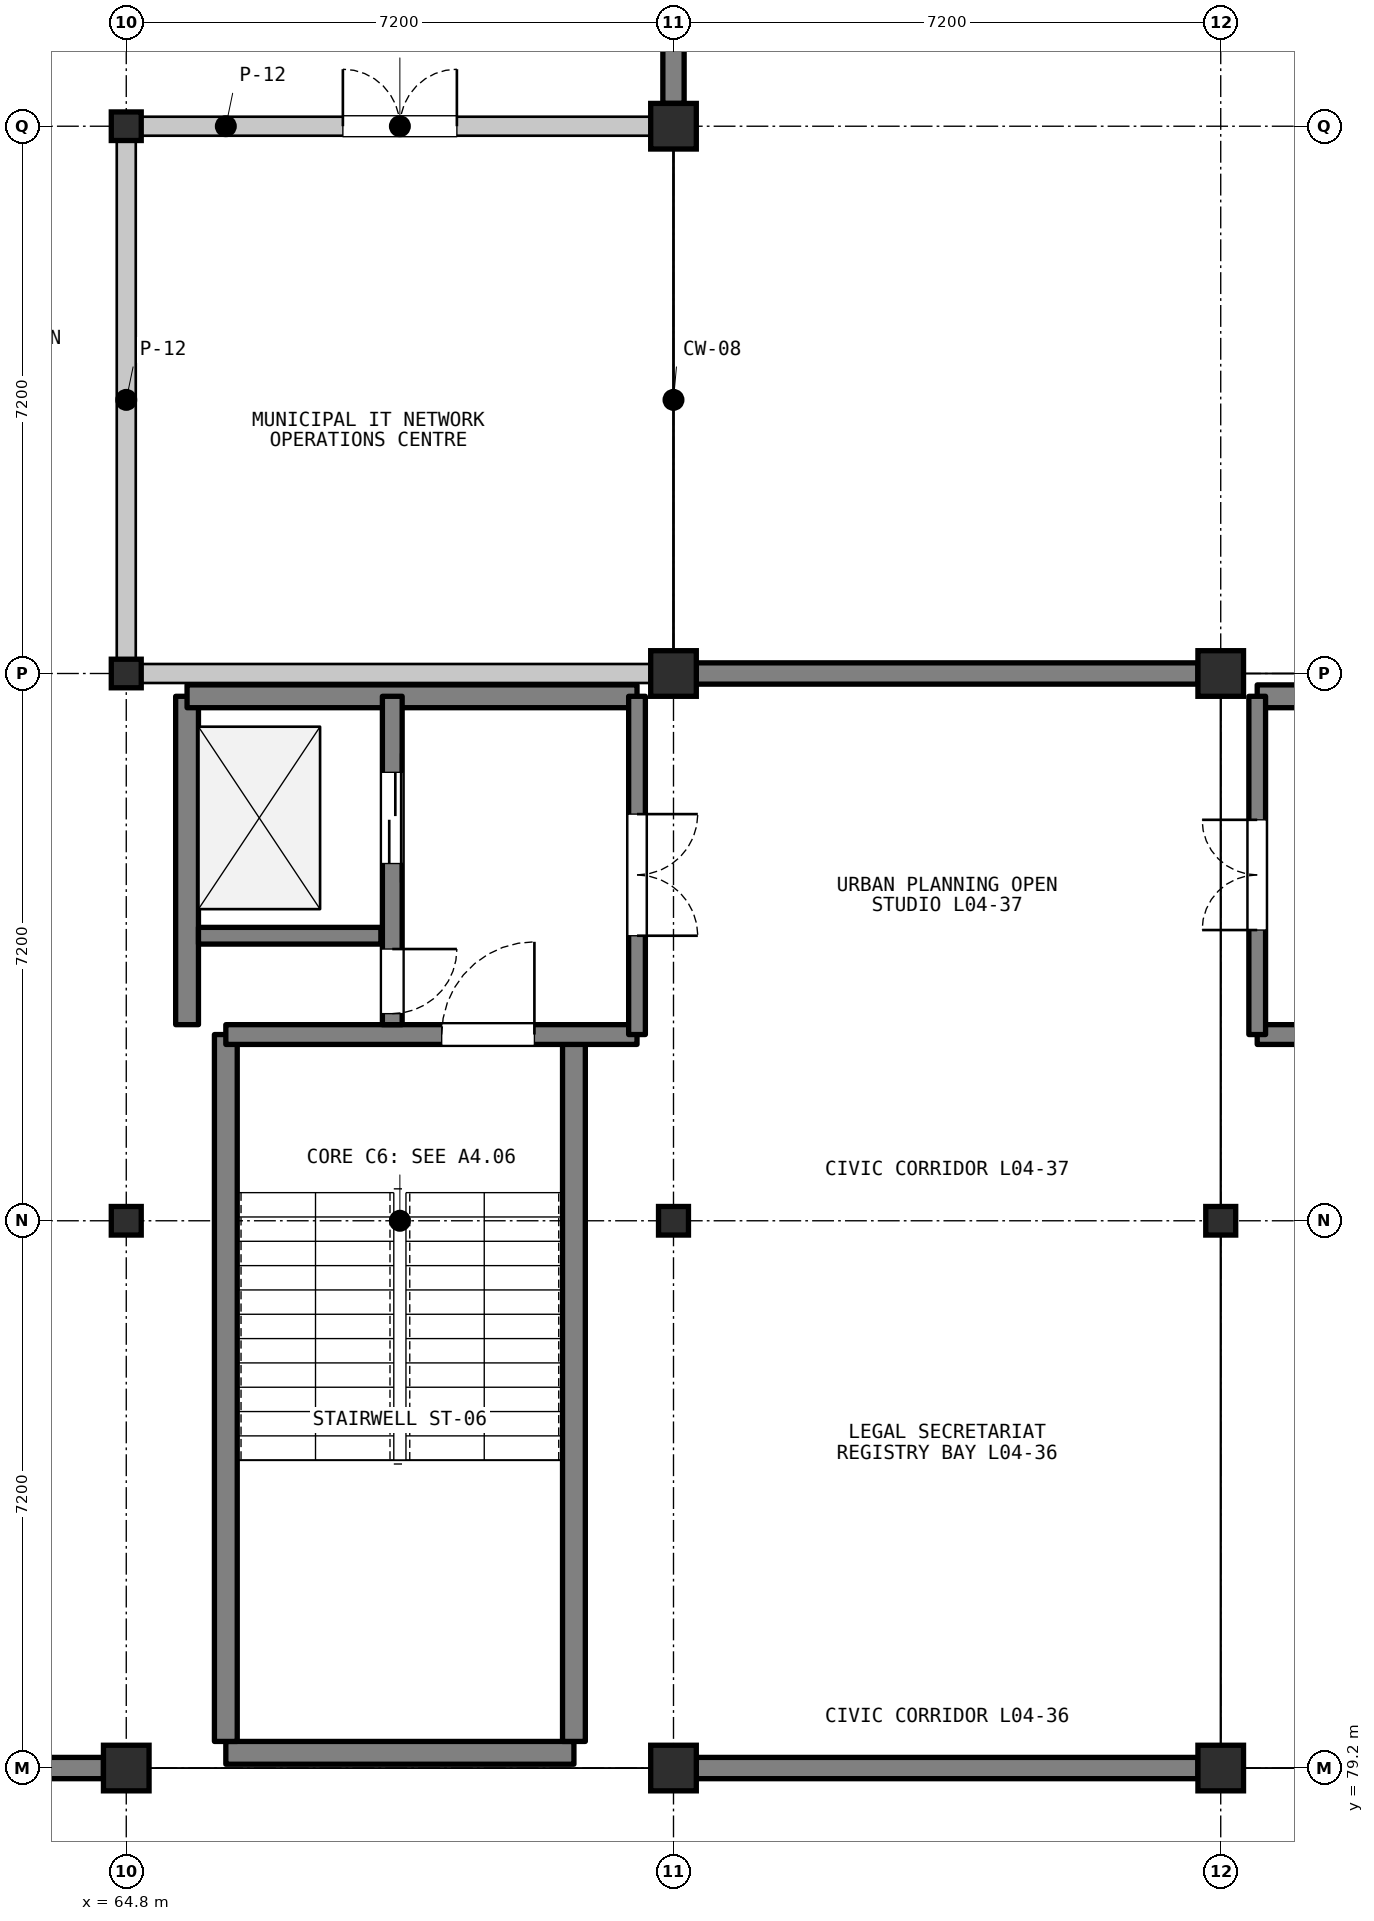
"""IFC4 building model, lengths in metres.
Left out: names, types, materials, properties, quantities, classifications, styles, units other than length and angle.
Written with IfcOpenShell. Run it as: python <this file> out.ifc"""

import sys

from ifc_helpers import new_model, si_unit, direction, frame, frame_2d, origin, origin_2d, place, context, subcontext, project, spatial, rectangle, i_section, extrude, element, fill, save


model = new_model("IFC4")
c1 = context("Model", 3, precision=1e-05, world=origin(), true_north=direction((0.0, 1.0)))
c2 = subcontext(c1, "Body", "Model", "MODEL_VIEW")
j1 = project(units=[si_unit("LENGTHUNIT", "METRE"), si_unit("PLANEANGLEUNIT", "RADIAN")], contexts=[c1])
p1 = place(None, origin())
s1 = spatial("IfcSite", under=j1, at=p1, CompositionType="ELEMENT")
p2 = place(p1, origin())
s2 = spatial("IfcBuilding", under=s1, at=p2, CompositionType="ELEMENT")
p3 = place(p2, frame((0.0, 0.0, 14.1)))
s3 = spatial("IfcBuildingStorey", under=s2, at=p3, CompositionType="ELEMENT", Elevation=14.1)
p4 = place(p3, frame((64.8, 79.2, 0.0), z_axis=(0.0, 0.0, 1.0), x_axis=(1.0, 0.0, 0.0)))
e1 = element("IfcColumn", 1, at=p4, inside=s3, PredefinedType="COLUMN", context=c2, shape_type="SweptSolid", body=[
    extrude(rectangle(XDim=0.6, YDim=0.6, at=origin_2d()), origin(), (0.0, 0.0, 1.0), 3.9),
])
for number, where, z_axis, x_axis in (
    (2, (64.8, 86.4, 0.0), (0.0, 0.0, 1.0), (1.0, 0.0, 0.0)),
    (3, (64.8, 93.6, 0.0), (0.0, 0.0, 1.0), (1.0, 0.0, 0.0)),
    (4, (64.8, 100.8, 0.0), (0.0, 0.0, 1.0), (1.0, 0.0, 0.0)),
):
    element("IfcColumn", number, at=place(p3, frame(where, z_axis=z_axis, x_axis=x_axis)), inside=s3, PredefinedType="COLUMN", context=c2, shape_type="SweptSolid", body=[
        extrude(i_section(OverallWidth=0.394, OverallDepth=0.376, WebThickness=0.017, FlangeThickness=0.028, FilletRadius=0.015, at=origin_2d()), origin(), (0.0, 0.0, 1.0), 3.9),
    ])
p5 = place(p3, frame((72.0, 79.2, 0.0), z_axis=(0.0, 0.0, 1.0), x_axis=(1.0, 0.0, 0.0)))
e5 = element("IfcColumn", 5, at=p5, inside=s3, PredefinedType="COLUMN", context=c2, shape_type="SweptSolid", body=[
    extrude(rectangle(XDim=0.6, YDim=0.6, at=origin_2d()), origin(), (0.0, 0.0, 1.0), 3.9),
])
p6 = place(p3, frame((72.0, 86.4, 0.0), z_axis=(0.0, 0.0, 1.0), x_axis=(1.0, 0.0, 0.0)))
e6 = element("IfcColumn", 6, at=p6, inside=s3, PredefinedType="COLUMN", context=c2, shape_type="SweptSolid", body=[
    extrude(i_section(OverallWidth=0.394, OverallDepth=0.376, WebThickness=0.017, FlangeThickness=0.028, FilletRadius=0.015, at=origin_2d()), origin(), (0.0, 0.0, 1.0), 3.9),
])
for number, where, z_axis, x_axis in (
    (7, (72.0, 93.6, 0.0), (0.0, 0.0, 1.0), (1.0, 0.0, 0.0)),
    (8, (72.0, 100.8, 0.0), (0.0, 0.0, 1.0), (1.0, 0.0, 0.0)),
    (9, (79.2, 79.2, 0.0), (0.0, 0.0, 1.0), (1.0, 0.0, 0.0)),
):
    element("IfcColumn", number, at=place(p3, frame(where, z_axis=z_axis, x_axis=x_axis)), inside=s3, PredefinedType="COLUMN", context=c2, shape_type="SweptSolid", body=[
        extrude(rectangle(XDim=0.6, YDim=0.6, at=origin_2d()), origin(), (0.0, 0.0, 1.0), 3.9),
    ])
p7 = place(p3, frame((79.2, 86.4, 0.0), z_axis=(0.0, 0.0, 1.0), x_axis=(1.0, 0.0, 0.0)))
e10 = element("IfcColumn", 10, at=p7, inside=s3, PredefinedType="COLUMN", context=c2, shape_type="SweptSolid", body=[
    extrude(i_section(OverallWidth=0.394, OverallDepth=0.376, WebThickness=0.017, FlangeThickness=0.028, FilletRadius=0.015, at=origin_2d()), origin(), (0.0, 0.0, 1.0), 3.9),
])
p8 = place(p3, frame((79.2, 93.6, 0.0), z_axis=(0.0, 0.0, 1.0), x_axis=(1.0, 0.0, 0.0)))
e11 = element("IfcColumn", 11, at=p8, inside=s3, PredefinedType="COLUMN", context=c2, shape_type="SweptSolid", body=[
    extrude(rectangle(XDim=0.6, YDim=0.6, at=origin_2d()), origin(), (0.0, 0.0, 1.0), 3.9),
])
p9 = place(p3, frame((64.5, 79.2, 0.0), z_axis=(0.0, 0.0, 1.0), x_axis=(-1.0, 0.0, 0.0)))
e12 = element("IfcWall", 12, at=p9, inside=s3, PredefinedType="SOLIDWALL", context=c2, shape_type="SweptSolid", body=[
    extrude(rectangle(XDim=6.6, YDim=0.28, at=frame_2d((3.3, 0.0))), origin(), (0.0, 0.0, 1.0), 3.118),
])
p10 = place(p3, frame((72.0, 107.7, 0.0), z_axis=(0.0, 0.0, 1.0), x_axis=(0.0, -1.0, 0.0)))
e13 = element("IfcWall", 13, at=p10, inside=s3, PredefinedType="SOLIDWALL", context=c2, shape_type="SweptSolid", body=[
    extrude(rectangle(XDim=6.6, YDim=0.28, at=frame_2d((3.3, 0.0))), origin(), (0.0, 0.0, 1.0), 3.192),
])
for number, where, z_axis, x_axis in (
    (14, (78.9, 79.2, 0.0), (0.0, 0.0, 1.0), (-1.0, 0.0, 0.0)),
    (15, (72.3, 93.6, 0.0), (0.0, 0.0, 1.0), (1.0, 0.0, 0.0)),
):
    element("IfcWall", number, at=place(p3, frame(where, z_axis=z_axis, x_axis=x_axis)), inside=s3, PredefinedType="SOLIDWALL", context=c2, shape_type="SweptSolid", body=[
        extrude(rectangle(XDim=6.6, YDim=0.28, at=frame_2d((3.3, 0.0))), origin(), (0.0, 0.0, 1.0), 3.118),
    ])
p11 = place(p3, frame((66.11, 79.4, 0.0), z_axis=(0.0, 0.0, 1.0), x_axis=(1.0, 0.0, 0.0)))
e16 = element("IfcWall", 16, at=p11, inside=s3, PredefinedType="SHEAR", context=c2, shape_type="SweptSolid", body=[
    extrude(rectangle(XDim=4.58, YDim=0.3, at=frame_2d((2.29, 0.0))), origin(), (0.0, 0.0, 1.0), 3.72),
])
for number, where, z_axis, x_axis in (
    (17, (66.11, 79.55, 0.0), (0.0, 0.0, 1.0), (0.0, 1.0, 0.0)),
    (18, (70.69, 79.55, 0.0), (0.0, 0.0, 1.0), (0.0, 1.0, 0.0)),
):
    element("IfcWall", number, at=place(p3, frame(where, z_axis=z_axis, x_axis=x_axis)), inside=s3, PredefinedType="SHEAR", context=c2, shape_type="SweptSolid", body=[
        extrude(rectangle(XDim=9.3, YDim=0.3, at=frame_2d((4.65, 0.0))), origin(), (0.0, 0.0, 1.0), 3.72),
    ])
p12 = place(p3, frame((66.11, 88.85, 0.0), z_axis=(0.0, 0.0, 1.0), x_axis=(1.0, 0.0, 0.0)))
e19 = element("IfcWall", 19, at=p12, inside=s3, PredefinedType="SHEAR", context=c2, shape_type="SweptSolid", body=[
    extrude(rectangle(XDim=5.41, YDim=0.26, at=frame_2d((2.705, 0.0))), origin(), (0.0, 0.0, 1.0), 3.72),
])
p13 = place(p12, frame((2.84, 0.0, 0.0)))
e20 = element("IfcOpeningElement", 20, at=p13, cuts=e19, PredefinedType="OPENING", context=c2, shape_type="SweptSolid", body=[
    extrude(rectangle(XDim=1.22, YDim=2.15, at=frame_2d((0.61, 1.075))), frame((0.0, 0.14, 0.0), z_axis=(0.0, -1.0, 0.0), x_axis=(1.0, 0.0, 0.0)), (0.0, 0.0, 1.0), 0.28),
])
p14 = place(p3, frame((65.6, 88.98, 0.0), z_axis=(0.0, 0.0, 1.0), x_axis=(0.0, 1.0, 0.0)))
e21 = element("IfcWall", 21, at=p14, inside=s3, PredefinedType="SHEAR", context=c2, shape_type="SweptSolid", body=[
    extrude(rectangle(XDim=4.32, YDim=0.3, at=frame_2d((2.16, 0.0))), origin(), (0.0, 0.0, 1.0), 3.72),
])
p15 = place(p3, frame((65.6, 93.3, 0.0), z_axis=(0.0, 0.0, 1.0), x_axis=(1.0, 0.0, 0.0)))
e22 = element("IfcWall", 22, at=p15, inside=s3, PredefinedType="SHEAR", context=c2, shape_type="SweptSolid", body=[
    extrude(rectangle(XDim=5.92, YDim=0.3, at=frame_2d((2.96, 0.0))), origin(), (0.0, 0.0, 1.0), 3.72),
])
p16 = place(p3, frame((65.75, 90.15, 0.0), z_axis=(0.0, 0.0, 1.0), x_axis=(1.0, 0.0, 0.0)))
e23 = element("IfcWall", 23, at=p16, inside=s3, PredefinedType="SHEAR", context=c2, shape_type="SweptSolid", body=[
    extrude(rectangle(XDim=2.4, YDim=0.22, at=frame_2d((1.2, 0.0))), origin(), (0.0, 0.0, 1.0), 3.72),
])
p17 = place(p3, frame((68.3, 93.3, 0.0), z_axis=(0.0, 0.0, 1.0), x_axis=(0.0, -1.0, 0.0)))
e24 = element("IfcWall", 24, at=p17, inside=s3, PredefinedType="SHEAR", context=c2, shape_type="SweptSolid", body=[
    extrude(rectangle(XDim=4.32, YDim=0.26, at=frame_2d((2.16, 0.0))), origin(), (0.0, 0.0, 1.0), 3.72),
])
p18 = place(p17, frame((1.0, 0.0, 0.0)))
e25 = element("IfcOpeningElement", 25, at=p18, cuts=e24, PredefinedType="OPENING", context=c2, shape_type="SweptSolid", body=[
    extrude(rectangle(XDim=1.2, YDim=2.15, at=frame_2d((0.6, 1.075))), frame((0.0, 0.14, 0.0), z_axis=(0.0, -1.0, 0.0), x_axis=(1.0, 0.0, 0.0)), (0.0, 0.0, 1.0), 0.28),
])
p19 = place(p17, frame((3.325, 0.0, 0.0)))
e26 = element("IfcOpeningElement", 26, at=p19, cuts=e24, PredefinedType="OPENING", context=c2, shape_type="SweptSolid", body=[
    extrude(rectangle(XDim=0.85, YDim=2.05, at=frame_2d((0.425, 1.025))), frame((0.0, 0.14, 0.0), z_axis=(0.0, -1.0, 0.0), x_axis=(1.0, 0.0, 0.0)), (0.0, 0.0, 1.0), 0.28),
])
p20 = place(p3, frame((71.52, 93.3, 0.0), z_axis=(0.0, 0.0, 1.0), x_axis=(0.0, -1.0, 0.0)))
e27 = element("IfcWall", 27, at=p20, inside=s3, PredefinedType="SHEAR", context=c2, shape_type="SweptSolid", body=[
    extrude(rectangle(XDim=4.45, YDim=0.22, at=frame_2d((2.225, 0.0))), origin(), (0.0, 0.0, 1.0), 3.72),
])
p21 = place(p20, frame((1.55, 0.0, 0.0)))
e28 = element("IfcOpeningElement", 28, at=p21, cuts=e27, PredefinedType="OPENING", context=c2, shape_type="SweptSolid", body=[
    extrude(rectangle(XDim=1.6, YDim=2.2, at=frame_2d((0.8, 1.1))), frame((0.0, 0.12, 0.0), z_axis=(0.0, -1.0, 0.0), x_axis=(1.0, 0.0, 0.0)), (0.0, 0.0, 1.0), 0.24),
])
p22 = place(p3, frame((79.68, 88.85, 0.0), z_axis=(0.0, 0.0, 1.0), x_axis=(1.0, 0.0, 0.0)))
e29 = element("IfcWall", 29, at=p22, inside=s3, PredefinedType="SHEAR", context=c2, shape_type="SweptSolid", body=[
    extrude(rectangle(XDim=5.41, YDim=0.26, at=frame_2d((2.705, 0.0))), origin(), (0.0, 0.0, 1.0), 3.72),
])
p23 = place(p22, frame((1.37, 0.0, 0.0)))
e30 = element("IfcOpeningElement", 30, at=p23, cuts=e29, PredefinedType="OPENING", context=c2, shape_type="SweptSolid", body=[
    extrude(rectangle(XDim=1.15, YDim=2.15, at=frame_2d((0.575, 1.075))), frame((0.0, 0.14, 0.0), z_axis=(0.0, -1.0, 0.0), x_axis=(1.0, 0.0, 0.0)), (0.0, 0.0, 1.0), 0.28),
])
p24 = place(p3, frame((79.68, 93.3, 0.0), z_axis=(0.0, 0.0, 1.0), x_axis=(1.0, 0.0, 0.0)))
e31 = element("IfcWall", 31, at=p24, inside=s3, PredefinedType="SHEAR", context=c2, shape_type="SweptSolid", body=[
    extrude(rectangle(XDim=5.92, YDim=0.3, at=frame_2d((2.96, 0.0))), origin(), (0.0, 0.0, 1.0), 3.72),
])
p25 = place(p3, frame((79.68, 88.85, 0.0), z_axis=(0.0, 0.0, 1.0), x_axis=(0.0, 1.0, 0.0)))
e32 = element("IfcWall", 32, at=p25, inside=s3, PredefinedType="SHEAR", context=c2, shape_type="SweptSolid", body=[
    extrude(rectangle(XDim=4.45, YDim=0.22, at=frame_2d((2.225, 0.0))), origin(), (0.0, 0.0, 1.0), 3.72),
])
p26 = place(p25, frame((1.375, 0.0, 0.0)))
e33 = element("IfcOpeningElement", 33, at=p26, cuts=e32, PredefinedType="OPENING", context=c2, shape_type="SweptSolid", body=[
    extrude(rectangle(XDim=1.45, YDim=2.2, at=frame_2d((0.725, 1.1))), frame((0.0, 0.12, 0.0), z_axis=(0.0, -1.0, 0.0), x_axis=(1.0, 0.0, 0.0)), (0.0, 0.0, 1.0), 0.24),
])
p27 = place(p3, frame((64.92, 100.8, 0.0), z_axis=(0.0, 0.0, 1.0), x_axis=(1.0, 0.0, 0.0)))
e34 = element("IfcWall", 34, at=p27, inside=s3, PredefinedType="PARTITIONING", context=c2, shape_type="SweptSolid", body=[
    extrude(rectangle(XDim=6.96, YDim=0.25, at=frame_2d((3.48, 0.0))), origin(), (0.0, 0.0, 1.0), 3.108),
])
p28 = place(p27, frame((2.73, 0.0, 0.0)))
e35 = element("IfcOpeningElement", 35, at=p28, cuts=e34, PredefinedType="OPENING", context=c2, shape_type="SweptSolid", body=[
    extrude(rectangle(XDim=1.5, YDim=2.25, at=frame_2d((0.75, 1.125))), frame((0.0, 0.135, 0.0), z_axis=(0.0, -1.0, 0.0), x_axis=(1.0, 0.0, 0.0)), (0.0, 0.0, 1.0), 0.27),
])
for number, where, z_axis, x_axis in (
    (36, (71.88, 93.6, 0.0), (0.0, 0.0, 1.0), (-1.0, 0.0, 0.0)),
    (37, (64.8, 93.72, 0.0), (0.0, 0.0, 1.0), (0.0, 1.0, 0.0)),
):
    element("IfcWall", number, at=place(p3, frame(where, z_axis=z_axis, x_axis=x_axis)), inside=s3, PredefinedType="PARTITIONING", context=c2, shape_type="SweptSolid", body=[
        extrude(rectangle(XDim=6.96, YDim=0.25, at=frame_2d((3.48, 0.0))), origin(), (0.0, 0.0, 1.0), 3.108),
    ])
p29 = place(p13, origin())
e38 = element("IfcDoor", 38, at=p29, inside=s3, OperationType="SINGLE_SWING_RIGHT", PredefinedType="DOOR", context=c2, shape_type="SweptSolid", body=[
    extrude(rectangle(XDim=1.22, YDim=2.15, at=frame_2d((0.61, 1.075))), frame((0.0, 0.025, 0.0), z_axis=(0.0, -1.0, 0.0), x_axis=(1.0, 0.0, 0.0)), (0.0, 0.0, 1.0), 0.05),
])
fill(e20, e38)
p30 = place(p18, origin())
e39 = element("IfcDoor", 39, at=p30, inside=s3, OperationType="DOUBLE_DOOR_SLIDING", PredefinedType="DOOR", context=c2, shape_type="SweptSolid", body=[
    extrude(rectangle(XDim=1.2, YDim=2.15, at=frame_2d((0.6, 1.075))), frame((0.0, 0.025, 0.0), z_axis=(0.0, -1.0, 0.0), x_axis=(1.0, 0.0, 0.0)), (0.0, 0.0, 1.0), 0.05),
])
fill(e25, e39)
p31 = place(p19, origin())
e40 = element("IfcDoor", 40, at=p31, inside=s3, OperationType="SINGLE_SWING_LEFT", PredefinedType="DOOR", context=c2, shape_type="SweptSolid", body=[
    extrude(rectangle(XDim=0.85, YDim=2.05, at=frame_2d((0.425, 1.025))), frame((0.0, 0.025, 0.0), z_axis=(0.0, -1.0, 0.0), x_axis=(1.0, 0.0, 0.0)), (0.0, 0.0, 1.0), 0.05),
])
fill(e26, e40)
p32 = place(p21, origin())
e41 = element("IfcDoor", 41, at=p32, inside=s3, OperationType="DOUBLE_DOOR_SINGLE_SWING", PredefinedType="DOOR", context=c2, shape_type="SweptSolid", body=[
    extrude(rectangle(XDim=1.6, YDim=2.2, at=frame_2d((0.8, 1.1))), frame((0.0, 0.025, 0.0), z_axis=(0.0, -1.0, 0.0), x_axis=(1.0, 0.0, 0.0)), (0.0, 0.0, 1.0), 0.05),
])
fill(e28, e41)
p33 = place(p26, origin())
e42 = element("IfcDoor", 42, at=p33, inside=s3, OperationType="DOUBLE_DOOR_SINGLE_SWING", PredefinedType="DOOR", context=c2, shape_type="SweptSolid", body=[
    extrude(rectangle(XDim=1.45, YDim=2.2, at=frame_2d((0.725, 1.1))), frame((0.0, 0.025, 0.0), z_axis=(0.0, -1.0, 0.0), x_axis=(1.0, 0.0, 0.0)), (0.0, 0.0, 1.0), 0.05),
])
fill(e33, e42)
p34 = place(p28, origin())
e43 = element("IfcDoor", 43, at=p34, inside=s3, OperationType="DOUBLE_DOOR_SINGLE_SWING", PredefinedType="DOOR", context=c2, shape_type="SweptSolid", body=[
    extrude(rectangle(XDim=1.5, YDim=2.25, at=frame_2d((0.75, 1.125))), frame((0.0, 0.025, 0.0), z_axis=(0.0, -1.0, 0.0), x_axis=(1.0, 0.0, 0.0)), (0.0, 0.0, 1.0), 0.05),
])
fill(e35, e43)
save(model, sys.argv[1])
